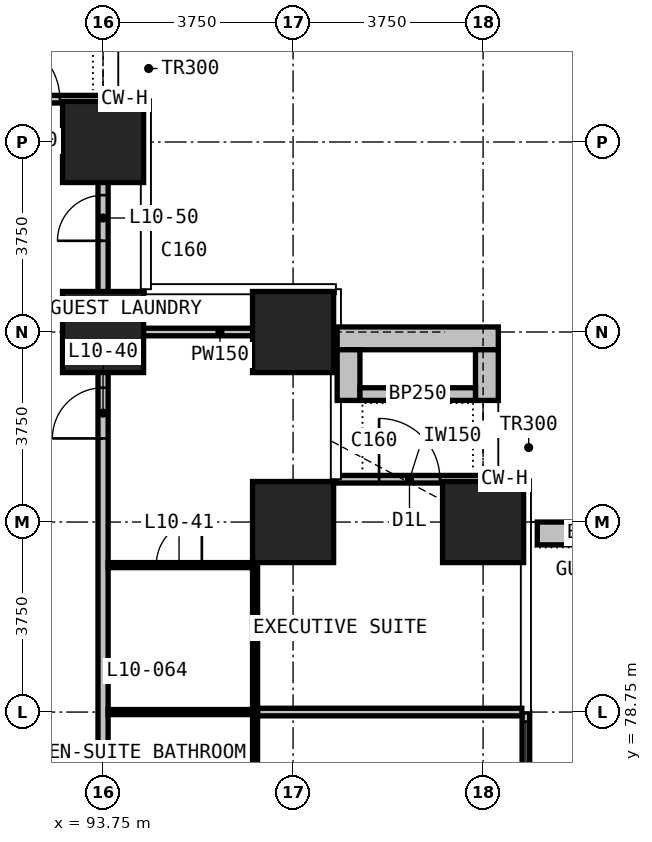
"""IFC4 building model, lengths in metres.
Left out: names, types, materials, properties, quantities, classifications, styles, units other than length and angle.
Written with IfcOpenShell. Run it as: python <this file> out.ifc"""

import sys

from ifc_helpers import new_model, si_unit, direction, frame, frame_2d, origin, origin_2d, place, context, subcontext, project, spatial, rectangle, extrude, element, fill, save


model = new_model("IFC4")
c1 = context("Model", 3, precision=1e-05, world=origin(), true_north=direction((0.0, 1.0)))
c2 = subcontext(c1, "Body", "Model", "MODEL_VIEW")
j1 = project(units=[si_unit("LENGTHUNIT", "METRE"), si_unit("PLANEANGLEUNIT", "RADIAN")], contexts=[c1])
p1 = place(None, origin())
s1 = spatial("IfcSite", under=j1, at=p1, CompositionType="ELEMENT")
p2 = place(p1, origin())
s2 = spatial("IfcBuilding", under=s1, at=p2, CompositionType="ELEMENT")
p3 = place(p2, frame((0.0, 0.0, 52.7)))
s3 = spatial("IfcBuildingStorey", under=s2, at=p3, CompositionType="ELEMENT", Elevation=52.7)
for number, where, z_axis, x_axis in (
    (1, (93.75, 86.25, 0.0), (0.0, 0.0, 1.0), (1.0, 0.0, 0.0)),
    (2, (93.75, 90.0, 0.0), (0.0, 0.0, 1.0), (1.0, 0.0, 0.0)),
    (3, (97.5, 82.5, 0.0), (0.0, 0.0, 1.0), (1.0, 0.0, 0.0)),
    (4, (97.5, 86.25, 0.0), (0.0, 0.0, 1.0), (1.0, 0.0, 0.0)),
    (5, (101.25, 82.5, 0.0), (0.0, 0.0, 1.0), (1.0, 0.0, 0.0)),
):
    element("IfcColumn", number, at=place(p3, frame(where, z_axis=z_axis, x_axis=x_axis)), inside=s3, PredefinedType="COLUMN", context=c2, shape_type="SweptSolid", body=[
        extrude(rectangle(XDim=1.6, YDim=1.6, at=origin_2d()), origin(), (0.0, 0.0, 1.0), 3.3),
    ])
p4 = place(p3, frame((102.095, 75.0, 0.0), z_axis=(0.0, 0.0, 1.0), x_axis=(0.0, 1.0, 0.0)))
e6 = element("IfcWall", 6, at=p4, inside=s3, PredefinedType="SOLIDWALL", context=c2, shape_type="SweptSolid", body=[
    extrude(rectangle(XDim=3.75, YDim=0.15, at=frame_2d((1.875, 0.0))), origin(), (0.0, 0.0, 1.0), 3.0),
])
p5 = place(p4, frame((1.275, 0.0, 0.0)))
e7 = element("IfcOpeningElement", 7, at=p5, cuts=e6, PredefinedType="OPENING", context=c2, shape_type="SweptSolid", body=[
    extrude(rectangle(XDim=1.2, YDim=2.4, at=frame_2d((0.6, 1.2))), frame((0.0, 0.085, 0.0), z_axis=(0.0, -1.0, 0.0), x_axis=(1.0, 0.0, 0.0)), (0.0, 0.0, 1.0), 0.17),
])
p6 = place(p4, frame((2.663, 0.0, 0.1)))
e8 = element("IfcOpeningElement", 8, at=p6, cuts=e6, PredefinedType="OPENING", context=c2, shape_type="SweptSolid", body=[
    extrude(rectangle(XDim=0.9, YDim=2.4, at=frame_2d((0.45, 1.2))), frame((0.0, 0.085, 0.0), z_axis=(0.0, -1.0, 0.0), x_axis=(1.0, 0.0, 0.0)), (0.0, 0.0, 1.0), 0.17),
])
p7 = place(p3, frame((98.345, 83.345, 0.0), z_axis=(0.0, 0.0, 1.0), x_axis=(1.0, 0.0, 0.0)))
e9 = element("IfcWall", 9, at=p7, inside=s3, PredefinedType="SOLIDWALL", context=c2, shape_type="SweptSolid", body=[
    extrude(rectangle(XDim=2.905, YDim=0.15, at=frame_2d((1.453, 0.0))), origin(), (0.0, 0.0, 1.0), 3.0),
])
p8 = place(p7, frame((0.853, 0.0, 0.0)))
e10 = element("IfcOpeningElement", 10, at=p8, cuts=e9, PredefinedType="OPENING", context=c2, shape_type="SweptSolid", body=[
    extrude(rectangle(XDim=1.2, YDim=2.0, at=frame_2d((0.6, 1.0))), frame((0.0, 0.085, 0.0), z_axis=(0.0, -1.0, 0.0), x_axis=(1.0, 0.0, 0.0)), (0.0, 0.0, 1.0), 0.17),
])
p9 = place(p3, frame((90.845, 90.845, 0.0), z_axis=(0.0, 0.0, 1.0), x_axis=(1.0, 0.0, 0.0)))
e11 = element("IfcWall", 11, at=p9, inside=s3, PredefinedType="SOLIDWALL", context=c2, shape_type="SweptSolid", body=[
    extrude(rectangle(XDim=2.905, YDim=0.15, at=frame_2d((1.453, 0.0))), origin(), (0.0, 0.0, 1.0), 3.0),
])
p10 = place(p9, frame((0.853, 0.0, 0.0)))
e12 = element("IfcOpeningElement", 12, at=p10, cuts=e11, PredefinedType="OPENING", context=c2, shape_type="SweptSolid", body=[
    extrude(rectangle(XDim=1.2, YDim=2.4, at=frame_2d((0.6, 1.2))), frame((0.0, 0.085, 0.0), z_axis=(0.0, -1.0, 0.0), x_axis=(1.0, 0.0, 0.0)), (0.0, 0.0, 1.0), 0.17),
])
p11 = place(p3, frame((102.32, 82.275, 0.0), z_axis=(0.0, 0.0, 1.0), x_axis=(1.0, 0.0, 0.0)))
e13 = element("IfcWall", 13, at=p11, inside=s3, PredefinedType="USERDEFINED", context=c2, shape_type="SweptSolid", body=[
    extrude(rectangle(XDim=2.33, YDim=0.45, at=frame_2d((1.165, 0.0))), origin(), (0.0, 0.0, 1.0), 1.1),
])
p12 = place(p3, frame((98.37, 86.125, 0.0), z_axis=(0.0, 0.0, 1.0), x_axis=(1.0, 0.0, 0.0)))
e14 = element("IfcWall", 14, at=p12, inside=s3, PredefinedType="USERDEFINED", context=c2, shape_type="SweptSolid", body=[
    extrude(rectangle(XDim=3.18, YDim=0.45, at=frame_2d((1.59, 0.0))), origin(), (0.0, 0.0, 1.0), 1.1),
])
for number, where, z_axis, x_axis in (
    (15, (98.595, 84.9, 0.0), (0.0, 0.0, 1.0), (0.0, 1.0, 0.0)),
    (16, (101.325, 84.9, 0.0), (0.0, 0.0, 1.0), (0.0, 1.0, 0.0)),
):
    element("IfcWall", number, at=place(p3, frame(where, z_axis=z_axis, x_axis=x_axis)), inside=s3, PredefinedType="USERDEFINED", context=c2, shape_type="SweptSolid", body=[
        extrude(rectangle(XDim=1.0, YDim=0.45, at=frame_2d((0.5, 0.0))), origin(), (0.0, 0.0, 1.0), 1.1),
    ])
p13 = place(p3, frame((98.82, 85.025, 0.0), z_axis=(0.0, 0.0, 1.0), x_axis=(1.0, 0.0, 0.0)))
e17 = element("IfcWall", 17, at=p13, inside=s3, PredefinedType="USERDEFINED", context=c2, shape_type="SweptSolid", body=[
    extrude(rectangle(XDim=2.28, YDim=0.25, at=frame_2d((1.14, 0.0))), origin(), (0.0, 0.0, 1.0), 1.0),
])
p14 = place(p3, frame((93.75, 52.4, 0.0), z_axis=(0.0, 0.0, 1.0), x_axis=(0.0, 1.0, 0.0)))
e18 = element("IfcWall", 18, at=p14, inside=s3, PredefinedType="PARTITIONING", context=c2, shape_type="SweptSolid", body=[
    extrude(rectangle(XDim=38.365, YDim=0.2, at=frame_2d((19.183, 0.0))), origin(), (0.0, 0.0, 1.0), 3.0),
])
p15 = place(p14, frame((2.35, 0.0, 0.0)))
e19 = element("IfcOpeningElement", 19, at=p15, cuts=e18, PredefinedType="OPENING", context=c2, shape_type="SweptSolid", body=[
    extrude(rectangle(XDim=1.0, YDim=2.2, at=frame_2d((0.5, 1.1))), frame((0.0, 0.11, 0.0), z_axis=(0.0, -1.0, 0.0), x_axis=(1.0, 0.0, 0.0)), (0.0, 0.0, 1.0), 0.22),
])
p16 = place(p14, frame((4.95, 0.0, 0.0)))
e20 = element("IfcOpeningElement", 20, at=p16, cuts=e18, PredefinedType="OPENING", context=c2, shape_type="SweptSolid", body=[
    extrude(rectangle(XDim=1.0, YDim=2.2, at=frame_2d((0.5, 1.1))), frame((0.0, 0.11, 0.0), z_axis=(0.0, -1.0, 0.0), x_axis=(1.0, 0.0, 0.0)), (0.0, 0.0, 1.0), 0.22),
])
p17 = place(p14, frame((16.75, 0.0, 0.0)))
e21 = element("IfcOpeningElement", 21, at=p17, cuts=e18, PredefinedType="OPENING", context=c2, shape_type="SweptSolid", body=[
    extrude(rectangle(XDim=1.0, YDim=2.2, at=frame_2d((0.5, 1.1))), frame((0.0, 0.11, 0.0), z_axis=(0.0, -1.0, 0.0), x_axis=(1.0, 0.0, 0.0)), (0.0, 0.0, 1.0), 0.22),
])
p18 = place(p14, frame((19.95, 0.0, 0.0)))
e22 = element("IfcOpeningElement", 22, at=p18, cuts=e18, PredefinedType="OPENING", context=c2, shape_type="SweptSolid", body=[
    extrude(rectangle(XDim=1.0, YDim=2.2, at=frame_2d((0.5, 1.1))), frame((0.0, 0.11, 0.0), z_axis=(0.0, -1.0, 0.0), x_axis=(1.0, 0.0, 0.0)), (0.0, 0.0, 1.0), 0.22),
])
p19 = place(p14, frame((31.75, 0.0, 0.0)))
e23 = element("IfcOpeningElement", 23, at=p19, cuts=e18, PredefinedType="OPENING", context=c2, shape_type="SweptSolid", body=[
    extrude(rectangle(XDim=1.0, YDim=2.2, at=frame_2d((0.5, 1.1))), frame((0.0, 0.11, 0.0), z_axis=(0.0, -1.0, 0.0), x_axis=(1.0, 0.0, 0.0)), (0.0, 0.0, 1.0), 0.22),
])
p20 = place(p14, frame((35.65, 0.0, 0.0)))
e24 = element("IfcOpeningElement", 24, at=p20, cuts=e18, PredefinedType="OPENING", context=c2, shape_type="SweptSolid", body=[
    extrude(rectangle(XDim=0.9, YDim=2.2, at=frame_2d((0.45, 1.1))), frame((0.0, 0.11, 0.0), z_axis=(0.0, -1.0, 0.0), x_axis=(1.0, 0.0, 0.0)), (0.0, 0.0, 1.0), 0.22),
])
p21 = place(p3, frame((96.8, 78.75, 0.0), z_axis=(0.0, 0.0, 1.0), x_axis=(1.0, 0.0, 0.0)))
e25 = element("IfcWall", 25, at=p21, inside=s3, PredefinedType="PARTITIONING", context=c2, shape_type="SweptSolid", body=[
    extrude(rectangle(XDim=5.215, YDim=0.15, at=frame_2d((2.607, 0.0))), origin(), (0.0, 0.0, 1.0), 3.0),
])
p22 = place(p3, frame((93.85, 86.25, 0.0), z_axis=(0.0, 0.0, 1.0), x_axis=(1.0, 0.0, 0.0)))
e26 = element("IfcWall", 26, at=p22, inside=s3, PredefinedType="PARTITIONING", context=c2, shape_type="SweptSolid", body=[
    extrude(rectangle(XDim=4.415, YDim=0.15, at=frame_2d((2.208, 0.0))), origin(), (0.0, 0.0, 1.0), 3.0),
])
p23 = place(p3, frame((93.85, 78.75, 0.0), z_axis=(0.0, 0.0, 1.0), x_axis=(1.0, 0.0, 0.0)))
e27 = element("IfcWall", 27, at=p23, inside=s3, PredefinedType="PARTITIONING", context=c2, shape_type="SweptSolid", body=[
    extrude(rectangle(XDim=2.85, YDim=0.1, at=frame_2d((1.425, 0.0))), origin(), (0.0, 0.0, 1.0), 3.0),
])
p24 = place(p3, frame((93.85, 81.65, 0.0), z_axis=(0.0, 0.0, 1.0), x_axis=(1.0, 0.0, 0.0)))
e28 = element("IfcWall", 28, at=p24, inside=s3, PredefinedType="PARTITIONING", context=c2, shape_type="SweptSolid", body=[
    extrude(rectangle(XDim=2.85, YDim=0.1, at=frame_2d((1.425, 0.0))), origin(), (0.0, 0.0, 1.0), 3.0),
])
p25 = place(p24, frame((0.95, 0.0, 0.0)))
e29 = element("IfcOpeningElement", 29, at=p25, cuts=e28, PredefinedType="OPENING", context=c2, shape_type="SweptSolid", body=[
    extrude(rectangle(XDim=0.9, YDim=2.2, at=frame_2d((0.45, 1.1))), frame((0.0, 0.06, 0.0), z_axis=(0.0, -1.0, 0.0), x_axis=(1.0, 0.0, 0.0)), (0.0, 0.0, 1.0), 0.12),
])
p26 = place(p3, frame((96.75, 75.8, 0.0), z_axis=(0.0, 0.0, 1.0), x_axis=(0.0, 1.0, 0.0)))
e30 = element("IfcWall", 30, at=p26, inside=s3, PredefinedType="PARTITIONING", context=c2, shape_type="SweptSolid", body=[
    extrude(rectangle(XDim=5.9, YDim=0.1, at=frame_2d((2.95, 0.0))), origin(), (0.0, 0.0, 1.0), 3.0),
])
p27 = place(p6, origin())
e31 = element("IfcWindow", 31, at=p27, inside=s3, PartitioningType="SINGLE_PANEL", PredefinedType="WINDOW", context=c2, shape_type="SweptSolid", body=[
    extrude(rectangle(XDim=0.9, YDim=2.4, at=frame_2d((0.45, 1.2))), frame((0.0, 0.03, 0.0), z_axis=(0.0, -1.0, 0.0), x_axis=(1.0, 0.0, 0.0)), (0.0, 0.0, 1.0), 0.06),
])
fill(e8, e31)
p28 = place(p8, origin())
e32 = element("IfcDoor", 32, at=p28, inside=s3, OperationType="SINGLE_SWING_LEFT", PredefinedType="DOOR", context=c2, shape_type="SweptSolid", body=[
    extrude(rectangle(XDim=1.2, YDim=2.0, at=frame_2d((0.6, 1.0))), frame((0.0, 0.025, 0.0), z_axis=(0.0, -1.0, 0.0), x_axis=(1.0, 0.0, 0.0)), (0.0, 0.0, 1.0), 0.05),
])
fill(e10, e32)
p29 = place(p10, origin())
e33 = element("IfcDoor", 33, at=p29, inside=s3, OperationType="SINGLE_SWING_LEFT", PredefinedType="DOOR", context=c2, shape_type="SweptSolid", body=[
    extrude(rectangle(XDim=1.2, YDim=2.4, at=frame_2d((0.6, 1.2))), frame((0.0, 0.025, 0.0), z_axis=(0.0, -1.0, 0.0), x_axis=(1.0, 0.0, 0.0)), (0.0, 0.0, 1.0), 0.05),
])
fill(e12, e33)
p30 = place(p19, origin())
e34 = element("IfcDoor", 34, at=p30, inside=s3, OperationType="SINGLE_SWING_LEFT", PredefinedType="DOOR", context=c2, shape_type="SweptSolid", body=[
    extrude(rectangle(XDim=1.0, YDim=2.2, at=frame_2d((0.5, 1.1))), frame((0.0, 0.025, 0.0), z_axis=(0.0, -1.0, 0.0), x_axis=(1.0, 0.0, 0.0)), (0.0, 0.0, 1.0), 0.05),
])
fill(e23, e34)
p31 = place(p25, origin())
e35 = element("IfcDoor", 35, at=p31, inside=s3, OperationType="SINGLE_SWING_RIGHT", PredefinedType="DOOR", context=c2, shape_type="SweptSolid", body=[
    extrude(rectangle(XDim=0.9, YDim=2.2, at=frame_2d((0.45, 1.1))), frame((0.0, 0.025, 0.0), z_axis=(0.0, -1.0, 0.0), x_axis=(1.0, 0.0, 0.0)), (0.0, 0.0, 1.0), 0.05),
])
fill(e29, e35)
p32 = place(p20, origin())
e36 = element("IfcDoor", 36, at=p32, inside=s3, OperationType="SINGLE_SWING_LEFT", PredefinedType="DOOR", context=c2, shape_type="SweptSolid", body=[
    extrude(rectangle(XDim=0.9, YDim=2.2, at=frame_2d((0.45, 1.1))), frame((0.0, 0.025, 0.0), z_axis=(0.0, -1.0, 0.0), x_axis=(1.0, 0.0, 0.0)), (0.0, 0.0, 1.0), 0.05),
])
fill(e24, e36)
save(model, sys.argv[1])
